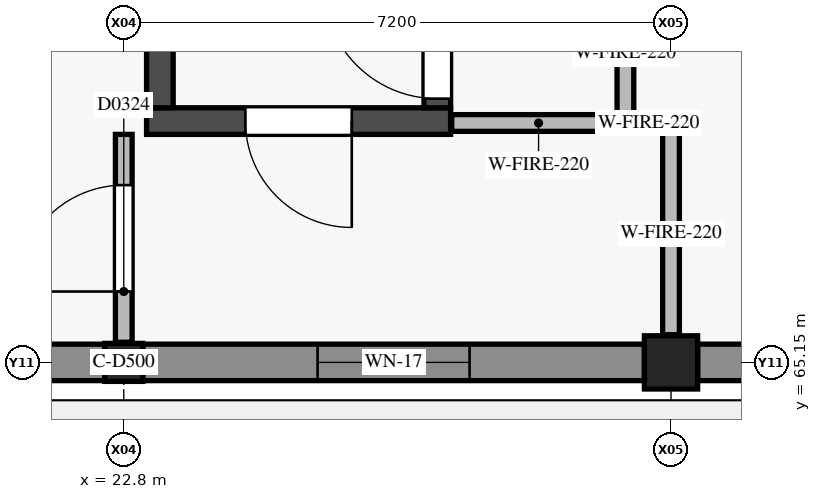
"""IFC4 building model, lengths in metres.
Left out: names, types, materials, properties, quantities, classifications, styles, units other than length and angle.
Written with IfcOpenShell. Run it as: python <this file> out.ifc"""

import sys

from ifc_helpers import new_model, si_unit, direction, frame, frame_2d, origin, origin_2d, place, context, subcontext, project, spatial, rectangle, circle, extrude, element, fill, save


model = new_model("IFC4")
c1 = context("Model", 3, precision=1e-05, world=origin(), true_north=direction((0.0, 1.0)))
c2 = subcontext(c1, "Body", "Model", "MODEL_VIEW")
j1 = project(units=[si_unit("LENGTHUNIT", "METRE"), si_unit("PLANEANGLEUNIT", "RADIAN")], contexts=[c1])
p1 = place(None, origin())
s1 = spatial("IfcSite", under=j1, at=p1, CompositionType="ELEMENT")
p2 = place(p1, origin())
s2 = spatial("IfcBuilding", under=s1, at=p2, CompositionType="ELEMENT")
p3 = place(p2, origin())
s3 = spatial("IfcBuildingStorey", under=s2, at=p3, CompositionType="ELEMENT", Elevation=0.0)
p4 = place(p3, frame((22.8, 65.15, 0.0), z_axis=(0.0, 0.0, 1.0), x_axis=(1.0, 0.0, 0.0)))
e1 = element("IfcColumn", 1, at=p4, inside=s3, PredefinedType="COLUMN", context=c2, shape_type="SweptSolid", body=[
    extrude(circle(Radius=0.25, at=origin_2d()), origin(), (0.0, 0.0, 1.0), 4.8),
])
p5 = place(p3, frame((30.0, 65.15, 0.0), z_axis=(0.0, 0.0, 1.0), x_axis=(1.0, 0.0, 0.0)))
e2 = element("IfcColumn", 2, at=p5, inside=s3, PredefinedType="COLUMN", context=c2, shape_type="SweptSolid", body=[
    extrude(circle(Radius=0.35, at=origin_2d()), origin(), (0.0, 0.0, 1.0), 4.8),
])
p6 = place(p3, frame((27.1, 68.325, 0.0), z_axis=(0.0, 0.0, 1.0), x_axis=(-1.0, 0.0, 0.0)))
e3 = element("IfcWall", 3, at=p6, inside=s3, PredefinedType="SHEAR", context=c2, shape_type="SweptSolid", body=[
    extrude(rectangle(XDim=4.0, YDim=0.35, at=frame_2d((2.0, 0.0))), origin(), (0.0, 0.0, 1.0), 4.52),
])
p7 = place(p6, frame((1.3, 0.0, 0.0)))
e4 = element("IfcOpeningElement", 4, at=p7, cuts=e3, PredefinedType="OPENING", context=c2, shape_type="SweptSolid", body=[
    extrude(rectangle(XDim=1.4, YDim=2.25, at=frame_2d((0.7, 1.125))), frame((0.0, 0.185, 0.0), z_axis=(0.0, -1.0, 0.0), x_axis=(1.0, 0.0, 0.0)), (0.0, 0.0, 1.0), 0.37),
])
p8 = place(p3, frame((23.275, 68.5, 0.0), z_axis=(0.0, 0.0, 1.0), x_axis=(0.0, 1.0, 0.0)))
e5 = element("IfcWall", 5, at=p8, inside=s3, PredefinedType="SHEAR", context=c2, shape_type="SweptSolid", body=[
    extrude(rectangle(XDim=7.3, YDim=0.35, at=frame_2d((3.65, 0.0))), origin(), (0.0, 0.0, 1.0), 4.52),
])
p9 = place(p3, frame((26.925, 68.5, 0.0), z_axis=(0.0, 0.0, 1.0), x_axis=(0.0, 1.0, 0.0)))
e6 = element("IfcWall", 6, at=p9, inside=s3, PredefinedType="SHEAR", context=c2, shape_type="SweptSolid", body=[
    extrude(rectangle(XDim=7.3, YDim=0.35, at=frame_2d((3.65, 0.0))), origin(), (0.0, 0.0, 1.0), 4.52),
])
p10 = place(p9, frame((0.12, 0.0, 0.0)))
e7 = element("IfcOpeningElement", 7, at=p10, cuts=e6, PredefinedType="OPENING", context=c2, shape_type="SweptSolid", body=[
    extrude(rectangle(XDim=1.5, YDim=2.15, at=frame_2d((0.75, 1.075))), frame((0.0, 0.185, 0.0), z_axis=(0.0, -1.0, 0.0), x_axis=(1.0, 0.0, 0.0)), (0.0, 0.0, 1.0), 0.37),
])
p11 = place(p3, frame((37.0, 65.15, 0.0), z_axis=(0.0, 0.0, 1.0), x_axis=(-1.0, 0.0, 0.0)))
e8 = element("IfcWall", 8, at=p11, inside=s3, PredefinedType="SOLIDWALL", context=c2, shape_type="SweptSolid", body=[
    extrude(rectangle(XDim=6.65, YDim=0.48, at=frame_2d((3.325, 0.0))), origin(), (0.0, 0.0, 1.0), 3.7),
])
p12 = place(p11, frame((0.677, 0.0, 0.95)))
e9 = element("IfcOpeningElement", 9, at=p12, cuts=e8, PredefinedType="OPENING", context=c2, shape_type="SweptSolid", body=[
    extrude(rectangle(XDim=0.9, YDim=1.2, at=frame_2d((0.45, 0.6))), frame((0.0, 0.25, 0.0), z_axis=(0.0, -1.0, 0.0), x_axis=(1.0, 0.0, 0.0)), (0.0, 0.0, 1.0), 0.5),
])
p13 = place(p11, frame((3.0, 0.0, 0.6)))
e10 = element("IfcOpeningElement", 10, at=p13, cuts=e8, PredefinedType="OPENING", context=c2, shape_type="SweptSolid", body=[
    extrude(rectangle(XDim=0.8, YDim=2.6, at=frame_2d((0.4, 1.3))), frame((0.0, 0.25, 0.0), z_axis=(0.0, -1.0, 0.0), x_axis=(1.0, 0.0, 0.0)), (0.0, 0.0, 1.0), 0.5),
])
p14 = place(p3, frame((29.65, 65.15, 0.0), z_axis=(0.0, 0.0, 1.0), x_axis=(-1.0, 0.0, 0.0)))
e11 = element("IfcWall", 11, at=p14, inside=s3, PredefinedType="SOLIDWALL", context=c2, shape_type="SweptSolid", body=[
    extrude(rectangle(XDim=6.6, YDim=0.48, at=frame_2d((3.3, 0.0))), origin(), (0.0, 0.0, 1.0), 3.7),
])
p15 = place(p14, frame((2.3, 0.0, 0.6)))
e12 = element("IfcOpeningElement", 12, at=p15, cuts=e11, PredefinedType="OPENING", context=c2, shape_type="SweptSolid", body=[
    extrude(rectangle(XDim=2.0, YDim=2.2, at=frame_2d((1.0, 1.1))), frame((0.0, 0.25, 0.0), z_axis=(0.0, -1.0, 0.0), x_axis=(1.0, 0.0, 0.0)), (0.0, 0.0, 1.0), 0.5),
])
p16 = place(p3, frame((22.55, 65.15, 0.0), z_axis=(0.0, 0.0, 1.0), x_axis=(-1.0, 0.0, 0.0)))
e13 = element("IfcWall", 13, at=p16, inside=s3, PredefinedType="SOLIDWALL", context=c2, shape_type="SweptSolid", body=[
    extrude(rectangle(XDim=6.65, YDim=0.48, at=frame_2d((3.325, 0.0))), origin(), (0.0, 0.0, 1.0), 3.7),
])
p17 = place(p16, frame((2.125, 0.0, 0.6)))
e14 = element("IfcOpeningElement", 14, at=p17, cuts=e13, PredefinedType="OPENING", context=c2, shape_type="SweptSolid", body=[
    extrude(rectangle(XDim=2.4, YDim=2.2, at=frame_2d((1.2, 1.1))), frame((0.0, 0.25, 0.0), z_axis=(0.0, -1.0, 0.0), x_axis=(1.0, 0.0, 0.0)), (0.0, 0.0, 1.0), 0.5),
])
p18 = place(p3, frame((27.115, 68.3, 0.0), z_axis=(0.0, 0.0, 1.0), x_axis=(1.0, 0.0, 0.0)))
e15 = element("IfcWall", 15, at=p18, inside=s3, PredefinedType="PARTITIONING", context=c2, shape_type="SweptSolid", body=[
    extrude(rectangle(XDim=2.285, YDim=0.22, at=frame_2d((1.143, 0.0))), origin(), (0.0, 0.0, 1.0), 4.52),
])
p19 = place(p3, frame((29.415, 68.3, 0.0), z_axis=(0.0, 0.0, 1.0), x_axis=(1.0, 0.0, 0.0)))
e16 = element("IfcWall", 16, at=p19, inside=s3, PredefinedType="PARTITIONING", context=c2, shape_type="SweptSolid", body=[
    extrude(rectangle(XDim=0.585, YDim=0.22, at=frame_2d((0.292, 0.0))), origin(), (0.0, 0.0, 1.0), 3.955),
])
p20 = place(p3, frame((29.4, 68.425, 0.0), z_axis=(0.0, 0.0, 1.0), x_axis=(0.0, 1.0, 0.0)))
e17 = element("IfcWall", 17, at=p20, inside=s3, PredefinedType="PARTITIONING", context=c2, shape_type="SweptSolid", body=[
    extrude(rectangle(XDim=1.575, YDim=0.22, at=frame_2d((0.788, 0.0))), origin(), (0.0, 0.0, 1.0), 4.52),
])
p21 = place(p3, frame((22.8, 65.415, 0.0), z_axis=(0.0, 0.0, 1.0), x_axis=(0.0, 1.0, 0.0)))
e18 = element("IfcWall", 18, at=p21, inside=s3, PredefinedType="PARTITIONING", context=c2, shape_type="SweptSolid", body=[
    extrude(rectangle(XDim=2.735, YDim=0.22, at=frame_2d((1.367, 0.0))), origin(), (0.0, 0.0, 1.0), 3.925),
])
p22 = place(p21, frame((0.667, 0.0, 0.0)))
e19 = element("IfcOpeningElement", 19, at=p22, cuts=e18, PredefinedType="OPENING", context=c2, shape_type="SweptSolid", body=[
    extrude(rectangle(XDim=1.4, YDim=2.2, at=frame_2d((0.7, 1.1))), frame((0.0, 0.12, 0.0), z_axis=(0.0, -1.0, 0.0), x_axis=(1.0, 0.0, 0.0)), (0.0, 0.0, 1.0), 0.24),
])
p23 = place(p3, frame((30.0, 65.515, 0.0), z_axis=(0.0, 0.0, 1.0), x_axis=(0.0, 1.0, 0.0)))
e20 = element("IfcWall", 20, at=p23, inside=s3, PredefinedType="PARTITIONING", context=c2, shape_type="SweptSolid", body=[
    extrude(rectangle(XDim=2.66, YDim=0.22, at=frame_2d((1.33, 0.0))), origin(), (0.0, 0.0, 1.0), 3.955),
])
p24 = place(p7, origin())
e21 = element("IfcDoor", 21, at=p24, inside=s3, OperationType="SINGLE_SWING_LEFT", PredefinedType="DOOR", context=c2, shape_type="SweptSolid", body=[
    extrude(rectangle(XDim=1.4, YDim=2.25, at=frame_2d((0.7, 1.125))), frame((0.0, 0.025, 0.0), z_axis=(0.0, -1.0, 0.0), x_axis=(1.0, 0.0, 0.0)), (0.0, 0.0, 1.0), 0.05),
])
fill(e4, e21)
p25 = place(p15, origin())
e22 = element("IfcWindow", 22, at=p25, inside=s3, PartitioningType="SINGLE_PANEL", PredefinedType="WINDOW", context=c2, shape_type="SweptSolid", body=[
    extrude(rectangle(XDim=2.0, YDim=2.2, at=frame_2d((1.0, 1.1))), frame((0.0, 0.03, 0.0), z_axis=(0.0, -1.0, 0.0), x_axis=(1.0, 0.0, 0.0)), (0.0, 0.0, 1.0), 0.06),
])
fill(e12, e22)
p26 = place(p10, origin())
e23 = element("IfcDoor", 23, at=p26, inside=s3, OperationType="SINGLE_SWING_RIGHT", PredefinedType="DOOR", context=c2, shape_type="SweptSolid", body=[
    extrude(rectangle(XDim=1.5, YDim=2.15, at=frame_2d((0.75, 1.075))), frame((0.0, 0.025, 0.0), z_axis=(0.0, -1.0, 0.0), x_axis=(1.0, 0.0, 0.0)), (0.0, 0.0, 1.0), 0.05),
])
fill(e7, e23)
p27 = place(p22, origin())
e24 = element("IfcDoor", 24, at=p27, inside=s3, OperationType="SINGLE_SWING_LEFT", PredefinedType="DOOR", context=c2, shape_type="SweptSolid", body=[
    extrude(rectangle(XDim=1.4, YDim=2.2, at=frame_2d((0.7, 1.1))), frame((0.0, 0.025, 0.0), z_axis=(0.0, -1.0, 0.0), x_axis=(1.0, 0.0, 0.0)), (0.0, 0.0, 1.0), 0.05),
])
fill(e19, e24)
save(model, sys.argv[1])
